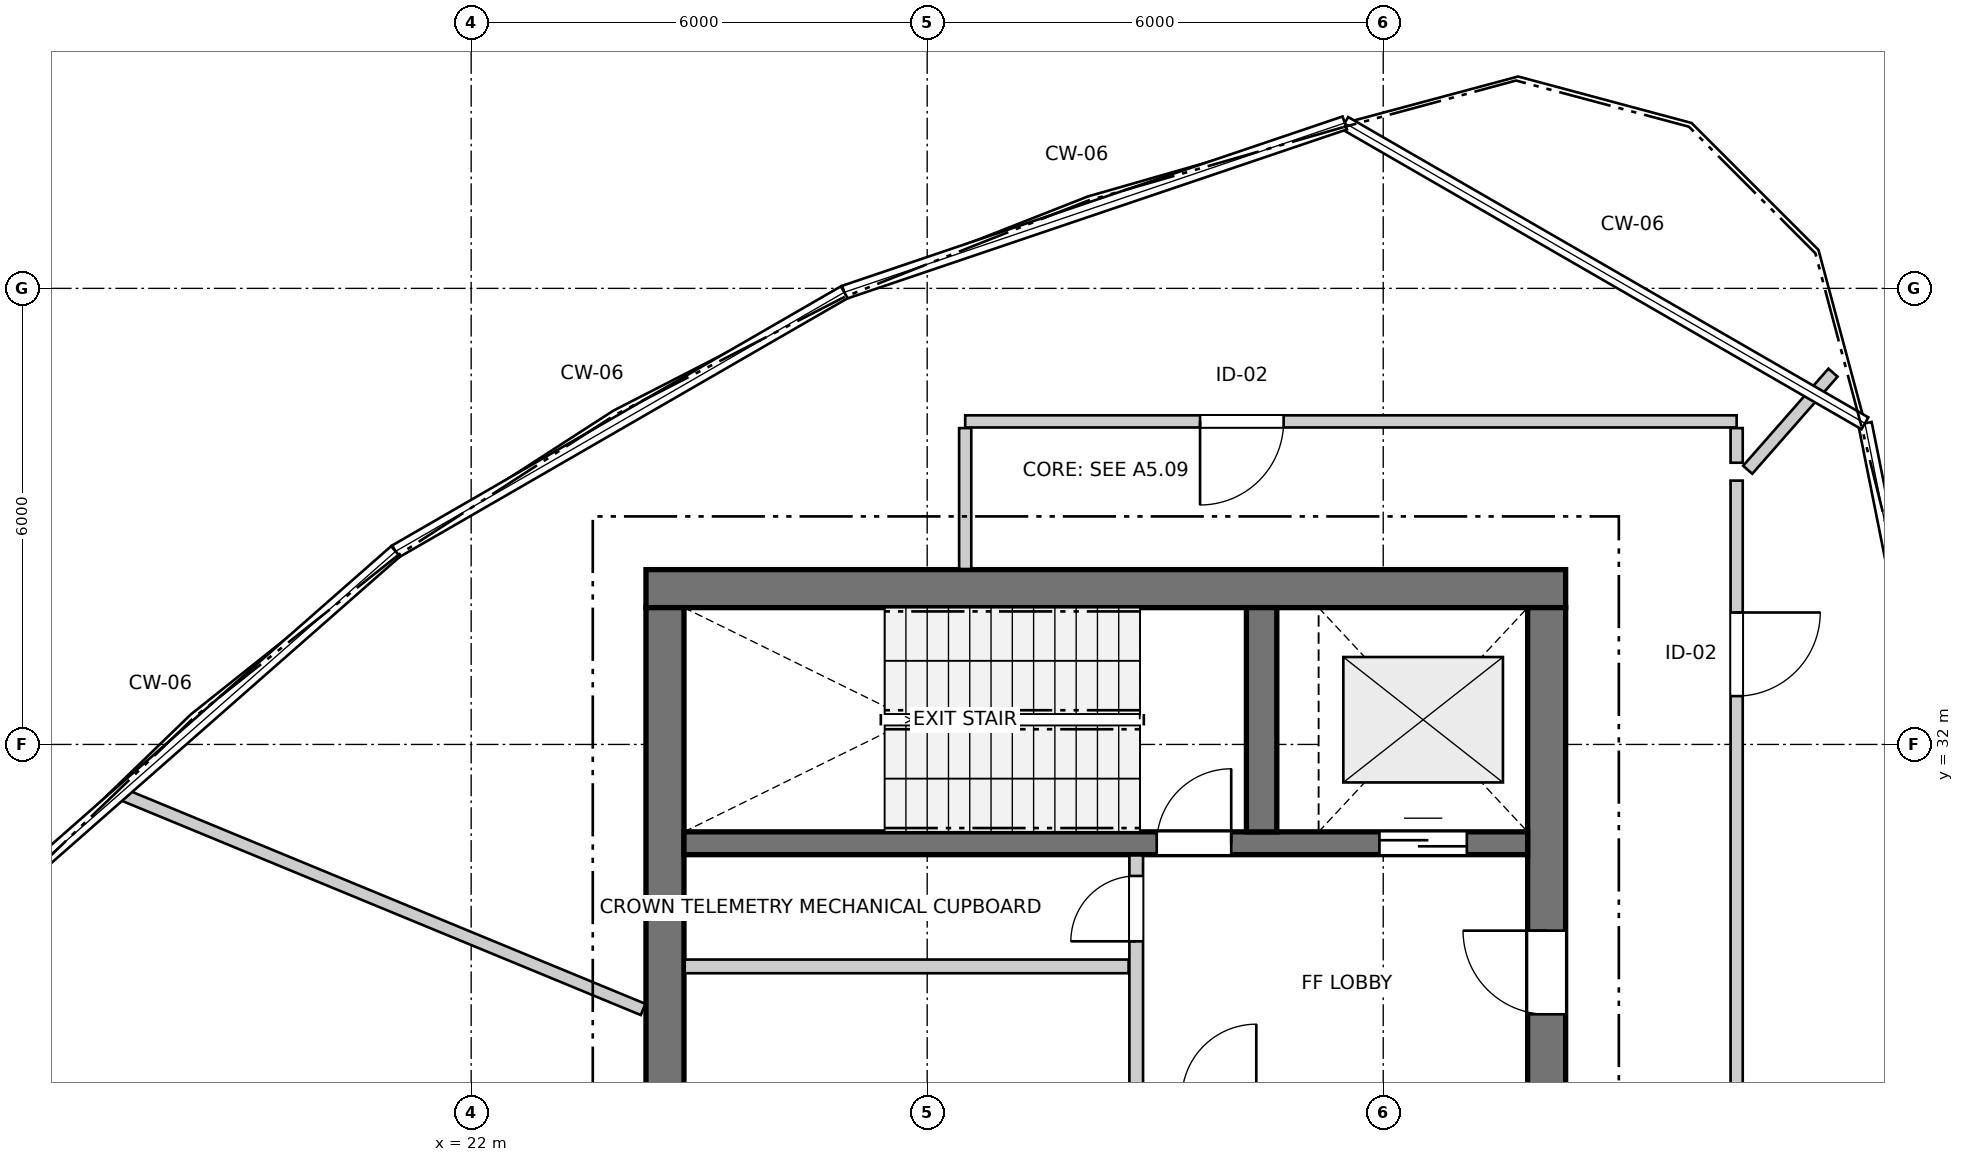
"""IFC4 building model, lengths in metres.
Left out: names, types, materials, properties, quantities, classifications, styles, units other than length and angle.
Written with IfcOpenShell. Run it as: python <this file> out.ifc"""

import sys

from ifc_helpers import new_model, si_unit, direction, frame, frame_2d, origin, place, context, subcontext, project, spatial, rectangle, extrude, source, transform, mapped, element, fill, save


model = new_model("IFC4")
c1 = context("Model", 3, precision=1e-05, world=origin(), true_north=direction((0.0, 1.0)))
c2 = subcontext(c1, "Body", "Model", "MODEL_VIEW")
j1 = project(units=[si_unit("LENGTHUNIT", "METRE"), si_unit("PLANEANGLEUNIT", "RADIAN")], contexts=[c1])
p1 = place(None, origin())
s1 = spatial("IfcSite", under=j1, at=p1, CompositionType="ELEMENT")
p2 = place(p1, origin())
s2 = spatial("IfcBuilding", under=s1, at=p2, CompositionType="ELEMENT")
p3 = place(p2, frame((0.0, 0.0, 266.1)))
s3 = spatial("IfcBuildingStorey", under=s2, at=p3, CompositionType="ELEMENT", Elevation=266.1)
p4 = place(p3, frame((36.4, 34.05, 0.0), z_axis=(0.0, 0.0, 1.0), x_axis=(-1.0, 0.0, 0.0)))
e1 = element("IfcWall", 1, at=p4, inside=s3, PredefinedType="SHEAR", context=c2, shape_type="SweptSolid", body=[
    extrude(rectangle(XDim=12.1, YDim=0.5, at=frame_2d((6.05, 0.0))), origin(), (0.0, 0.0, 1.0), 4.05),
])
p5 = place(p3, frame((24.55, 33.8, 0.0), z_axis=(0.0, 0.0, 1.0), x_axis=(0.0, -1.0, 0.0)))
e2 = element("IfcWall", 2, at=p5, inside=s3, PredefinedType="SHEAR", context=c2, shape_type="SweptSolid", body=[
    extrude(rectangle(XDim=15.6, YDim=0.5, at=frame_2d((7.8, 0.0))), origin(), (0.0, 0.0, 1.0), 4.05),
])
p6 = place(p3, frame((36.15, 18.2, 0.0), z_axis=(0.0, 0.0, 1.0), x_axis=(0.0, 1.0, 0.0)))
e3 = element("IfcWall", 3, at=p6, inside=s3, PredefinedType="SHEAR", context=c2, shape_type="SweptSolid", body=[
    extrude(rectangle(XDim=15.6, YDim=0.5, at=frame_2d((7.8, 0.0))), origin(), (0.0, 0.0, 1.0), 4.05),
])
p7 = place(p6, frame((4.25, 0.0, 0.0)))
e4 = element("IfcOpeningElement", 4, at=p7, cuts=e3, PredefinedType="OPENING", context=c2, shape_type="SweptSolid", body=[
    extrude(rectangle(XDim=1.1, YDim=2.15, at=frame_2d((0.55, 1.075))), frame((0.0, 0.26, 0.0), z_axis=(0.0, -1.0, 0.0), x_axis=(1.0, 0.0, 0.0)), (0.0, 0.0, 1.0), 0.52),
])
p8 = place(p6, frame((10.25, 0.0, 0.0)))
e5 = element("IfcOpeningElement", 5, at=p8, cuts=e3, PredefinedType="OPENING", context=c2, shape_type="SweptSolid", body=[
    extrude(rectangle(XDim=1.1, YDim=2.15, at=frame_2d((0.55, 1.075))), frame((0.0, 0.26, 0.0), z_axis=(0.0, -1.0, 0.0), x_axis=(1.0, 0.0, 0.0)), (0.0, 0.0, 1.0), 0.52),
])
p9 = place(p3, frame((24.8, 30.7, 0.0), z_axis=(0.0, 0.0, 1.0), x_axis=(1.0, 0.0, 0.0)))
e6 = element("IfcWall", 6, at=p9, inside=s3, PredefinedType="SHEAR", context=c2, shape_type="SweptSolid", body=[
    extrude(rectangle(XDim=11.1, YDim=0.3, at=frame_2d((5.55, 0.0))), origin(), (0.0, 0.0, 1.0), 4.05),
])
p10 = place(p9, frame((6.22, 0.0, 0.0)))
e7 = element("IfcOpeningElement", 7, at=p10, cuts=e6, PredefinedType="OPENING", context=c2, shape_type="SweptSolid", body=[
    extrude(rectangle(XDim=0.98, YDim=2.15, at=frame_2d((0.49, 1.075))), frame((0.0, 0.16, 0.0), z_axis=(0.0, -1.0, 0.0), x_axis=(1.0, 0.0, 0.0)), (0.0, 0.0, 1.0), 0.32),
])
p11 = place(p9, frame((9.15, 0.0, 0.0)))
e8 = element("IfcOpeningElement", 8, at=p11, cuts=e6, PredefinedType="OPENING", context=c2, shape_type="SweptSolid", body=[
    extrude(rectangle(XDim=1.15, YDim=2.15, at=frame_2d((0.575, 1.075))), frame((0.0, 0.16, 0.0), z_axis=(0.0, -1.0, 0.0), x_axis=(1.0, 0.0, 0.0)), (0.0, 0.0, 1.0), 0.32),
])
p12 = place(p3, frame((32.4, 30.85, 0.0), z_axis=(0.0, 0.0, 1.0), x_axis=(0.0, 1.0, 0.0)))
e9 = element("IfcWall", 9, at=p12, inside=s3, PredefinedType="SHEAR", context=c2, shape_type="SweptSolid", body=[
    extrude(rectangle(XDim=2.95, YDim=0.4, at=frame_2d((1.475, 0.0))), origin(), (0.0, 0.0, 1.0), 4.05),
])
p13 = place(p3, frame((30.75, 27.43, 0.0), z_axis=(0.0, 0.0, 1.0), x_axis=(0.0, 1.0, 0.0)))
e10 = element("IfcWall", 10, at=p13, inside=s3, PredefinedType="PARTITIONING", context=c2, shape_type="SweptSolid", body=[
    extrude(rectangle(XDim=3.11, YDim=0.18, at=frame_2d((1.555, 0.0))), origin(), (0.0, 0.0, 1.0), 4.05),
])
p14 = place(p13, frame((1.98, 0.0, 0.0)))
e11 = element("IfcOpeningElement", 11, at=p14, cuts=e10, PredefinedType="OPENING", context=c2, shape_type="SweptSolid", body=[
    extrude(rectangle(XDim=0.86, YDim=2.05, at=frame_2d((0.43, 1.025))), frame((0.0, 0.1, 0.0), z_axis=(0.0, -1.0, 0.0), x_axis=(1.0, 0.0, 0.0)), (0.0, 0.0, 1.0), 0.2),
])
p15 = place(p3, frame((24.81, 29.08, 0.0), z_axis=(0.0, 0.0, 1.0), x_axis=(1.0, 0.0, 0.0)))
e12 = element("IfcWall", 12, at=p15, inside=s3, PredefinedType="PARTITIONING", context=c2, shape_type="SweptSolid", body=[
    extrude(rectangle(XDim=5.84, YDim=0.18, at=frame_2d((2.92, 0.0))), origin(), (0.0, 0.0, 1.0), 4.05),
])
p16 = place(p3, frame((38.65, 35.471, 0.0), z_axis=(0.0, 0.0, 1.0), x_axis=(0.0, -1.0, 0.0)))
e13 = element("IfcWall", 13, at=p16, inside=s3, PredefinedType="PARTITIONING", context=c2, shape_type="SweptSolid", body=[
    extrude(rectangle(XDim=19.721, YDim=0.16, at=frame_2d((9.86, 0.0))), origin(), (0.0, 0.0, 1.0), 4.05),
])
p17 = place(p16, frame((1.735, 0.0, 0.0)))
e14 = element("IfcOpeningElement", 14, at=p17, cuts=e13, PredefinedType="OPENING", context=c2, shape_type="SweptSolid", body=[
    extrude(rectangle(XDim=1.1, YDim=2.15, at=frame_2d((0.55, 1.075))), frame((0.0, 0.09, 0.0), z_axis=(0.0, -1.0, 0.0), x_axis=(1.0, 0.0, 0.0)), (0.0, 0.0, 1.0), 0.18),
])
p18 = place(p3, frame((38.65, 36.25, 0.0), z_axis=(0.0, 0.0, 1.0), x_axis=(-1.0, 0.0, 0.0)))
e15 = element("IfcWall", 15, at=p18, inside=s3, PredefinedType="PARTITIONING", context=c2, shape_type="SweptSolid", body=[
    extrude(rectangle(XDim=10.15, YDim=0.16, at=frame_2d((5.075, 0.0))), origin(), (0.0, 0.0, 1.0), 4.05),
])
p19 = place(p18, frame((5.96, 0.0, 0.0)))
e16 = element("IfcOpeningElement", 16, at=p19, cuts=e15, PredefinedType="OPENING", context=c2, shape_type="SweptSolid", body=[
    extrude(rectangle(XDim=1.1, YDim=2.15, at=frame_2d((0.55, 1.075))), frame((0.0, 0.09, 0.0), z_axis=(0.0, -1.0, 0.0), x_axis=(1.0, 0.0, 0.0)), (0.0, 0.0, 1.0), 0.18),
])
p20 = place(p3, frame((17.407, 31.344, 0.0), z_axis=(0.0, 0.0, 1.0), x_axis=(0.92431974827, -0.381618923743, 0.0)))
e17 = element("IfcWall", 17, at=p20, inside=s3, PredefinedType="PARTITIONING", context=c2, shape_type="SweptSolid", body=[
    extrude(rectangle(XDim=7.416, YDim=0.16, at=frame_2d((3.708, 0.0))), origin(), (0.0, 0.0, 1.0), 4.05),
])
p21 = place(p3, frame((28.5, 34.308, 0.0), z_axis=(0.0, 0.0, 1.0), x_axis=(0.0, 1.0, 0.0)))
e18 = element("IfcWall", 18, at=p21, inside=s3, PredefinedType="PARTITIONING", context=c2, shape_type="SweptSolid", body=[
    extrude(rectangle(XDim=1.854, YDim=0.16, at=frame_2d((0.927, 0.0))), origin(), (0.0, 0.0, 1.0), 3.318),
])
p22 = place(p3, frame((38.795, 35.614, 0.0), z_axis=(0.0, 0.0, 1.0), x_axis=(0.659905949222, 0.751348213667, 0.0)))
e19 = element("IfcWall", 19, at=p22, inside=s3, PredefinedType="PARTITIONING", context=c2, shape_type="SweptSolid", body=[
    extrude(rectangle(XDim=1.701, YDim=0.16, at=frame_2d((0.85, 0.0))), origin(), (0.0, 0.0, 1.0), 4.05),
])
p23 = place(p3, frame((38.65, 35.706, 0.0), z_axis=(0.0, 0.0, 1.0), x_axis=(0.0, 1.0, 0.0)))
e20 = element("IfcWall", 20, at=p23, inside=s3, PredefinedType="PARTITIONING", context=c2, shape_type="SweptSolid", body=[
    extrude(rectangle(XDim=0.456, YDim=0.16, at=frame_2d((0.228, 0.0))), origin(), (0.0, 0.0, 1.0), 4.05),
])
m1 = source(origin(), c2, "Body", "SweptSolid", [
    extrude(rectangle(XDim=0.98, YDim=2.15, at=frame_2d((0.49, 1.075))), frame((0.0, 0.025, 0.0), z_axis=(0.0, -1.0, 0.0), x_axis=(1.0, 0.0, 0.0)), (0.0, 0.0, 1.0), 0.05),
])
p24 = place(p10, origin())
e21 = element("IfcDoor", 21, at=p24, inside=s3, OperationType="SINGLE_SWING_RIGHT", PredefinedType="DOOR", context=c2, shape_type="MappedRepresentation", body=[
    mapped(m1, transform((0.0, 0.0, 0.0), x_axis=(1.0, 0.0, 0.0), y_axis=(0.0, 1.0, 0.0), z_axis=(0.0, 0.0, 1.0), scale=1.0)),
])
fill(e7, e21)
m2 = source(origin(), c2, "Body", "SweptSolid", [
    extrude(rectangle(XDim=1.15, YDim=2.15, at=frame_2d((0.575, 1.075))), frame((0.0, 0.025, 0.0), z_axis=(0.0, -1.0, 0.0), x_axis=(1.0, 0.0, 0.0)), (0.0, 0.0, 1.0), 0.05),
])
p25 = place(p11, origin())
e22 = element("IfcDoor", 22, at=p25, inside=s3, OperationType="DOUBLE_DOOR_SLIDING", PredefinedType="DOOR", context=c2, shape_type="MappedRepresentation", body=[
    mapped(m2, transform((0.0, 0.0, 0.0), x_axis=(1.0, 0.0, 0.0), y_axis=(0.0, 1.0, 0.0), z_axis=(0.0, 0.0, 1.0), scale=1.0)),
])
fill(e8, e22)
m3 = source(origin(), c2, "Body", "SweptSolid", [
    extrude(rectangle(XDim=1.1, YDim=2.15, at=frame_2d((0.55, 1.075))), frame((0.0, 0.025, 0.0), z_axis=(0.0, -1.0, 0.0), x_axis=(1.0, 0.0, 0.0)), (0.0, 0.0, 1.0), 0.05),
])
p26 = place(p8, origin())
e23 = element("IfcDoor", 23, at=p26, inside=s3, OperationType="SINGLE_SWING_RIGHT", PredefinedType="DOOR", context=c2, shape_type="MappedRepresentation", body=[
    mapped(m3, transform((0.0, 0.0, 0.0), x_axis=(1.0, 0.0, 0.0), y_axis=(0.0, 1.0, 0.0), z_axis=(0.0, 0.0, 1.0), scale=1.0)),
])
fill(e5, e23)
m4 = source(origin(), c2, "Body", "SweptSolid", [
    extrude(rectangle(XDim=0.86, YDim=2.05, at=frame_2d((0.43, 1.025))), frame((0.0, 0.025, 0.0), z_axis=(0.0, -1.0, 0.0), x_axis=(1.0, 0.0, 0.0)), (0.0, 0.0, 1.0), 0.05),
])
p27 = place(p14, origin())
e24 = element("IfcDoor", 24, at=p27, inside=s3, OperationType="SINGLE_SWING_LEFT", PredefinedType="DOOR", context=c2, shape_type="MappedRepresentation", body=[
    mapped(m4, transform((0.0, 0.0, 0.0), x_axis=(1.0, 0.0, 0.0), y_axis=(0.0, 1.0, 0.0), z_axis=(0.0, 0.0, 1.0), scale=1.0)),
])
fill(e11, e24)
p28 = place(p17, origin())
e25 = element("IfcDoor", 25, at=p28, inside=s3, OperationType="SINGLE_SWING_LEFT", PredefinedType="DOOR", context=c2, shape_type="MappedRepresentation", body=[
    mapped(m3, transform((0.0, 0.0, 0.0), x_axis=(1.0, 0.0, 0.0), y_axis=(0.0, 1.0, 0.0), z_axis=(0.0, 0.0, 1.0), scale=1.0)),
])
fill(e14, e25)
p29 = place(p19, origin())
e26 = element("IfcDoor", 26, at=p29, inside=s3, OperationType="SINGLE_SWING_RIGHT", PredefinedType="DOOR", context=c2, shape_type="MappedRepresentation", body=[
    mapped(m3, transform((0.0, 0.0, 0.0), x_axis=(1.0, 0.0, 0.0), y_axis=(0.0, 1.0, 0.0), z_axis=(0.0, 0.0, 1.0), scale=1.0)),
])
fill(e16, e26)
save(model, sys.argv[1])
